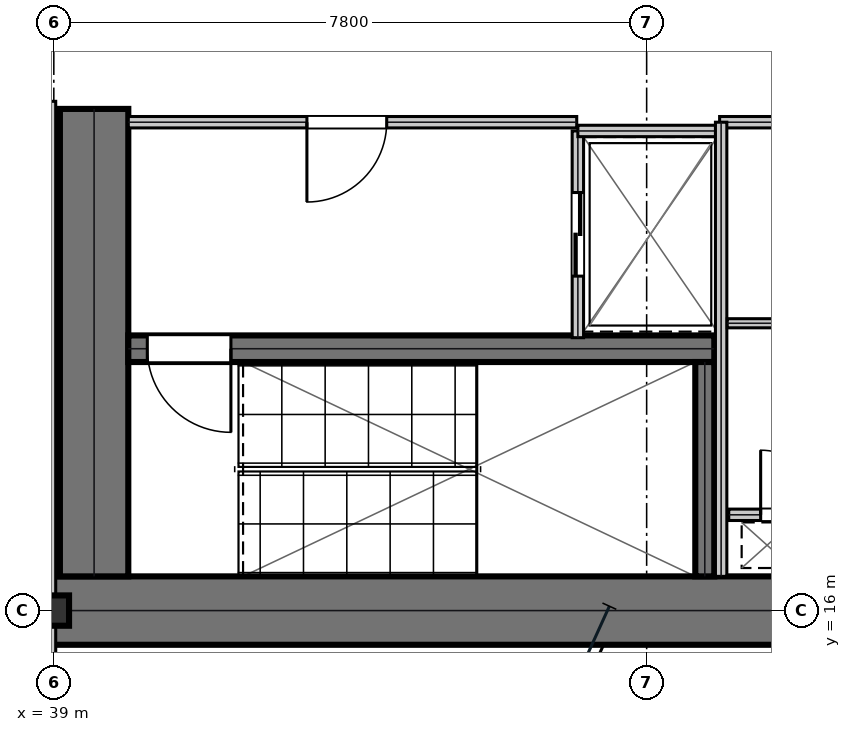
"""IFC4 building model, lengths in metres.
Left out: names, types, materials, properties, quantities, classifications, styles, units other than length and angle.
Written with IfcOpenShell. Run it as: python <this file> out.ifc"""

import sys

from ifc_helpers import new_model, si_unit, direction, frame, frame_2d, origin, origin_2d, place, context, subcontext, project, spatial, rectangle, i_section, extrude, element, fill, save


model = new_model("IFC4")
c1 = context("Model", 3, precision=1e-05, world=origin(), true_north=direction((0.0, 1.0)))
c2 = subcontext(c1, "Body", "Model", "MODEL_VIEW")
j1 = project(units=[si_unit("LENGTHUNIT", "METRE"), si_unit("PLANEANGLEUNIT", "RADIAN")], contexts=[c1])
p1 = place(None, origin())
s1 = spatial("IfcSite", under=j1, at=p1, CompositionType="ELEMENT")
p2 = place(p1, origin())
s2 = spatial("IfcBuilding", under=s1, at=p2, CompositionType="ELEMENT")
p3 = place(p2, frame((0.0, 0.0, 102.6)))
s3 = spatial("IfcBuildingStorey", under=s2, at=p3, CompositionType="ELEMENT", Elevation=102.6)
p4 = place(p3, frame((38.8, 16.0, 0.0), z_axis=(0.0, 0.0, 1.0), x_axis=(1.0, 0.0, 0.0)))
e1 = element("IfcWall", 1, at=p4, inside=s3, PredefinedType="SHEAR", context=c2, shape_type="SweptSolid", body=[
    extrude(rectangle(XDim=16.0, YDim=0.9, at=frame_2d((8.0, 0.0))), origin(), (0.0, 0.0, 1.0), 3.73),
])
p5 = place(p3, frame((39.53, 16.45, 0.0), z_axis=(0.0, 0.0, 1.0), x_axis=(0.0, 1.0, 0.0)))
e2 = element("IfcWall", 2, at=p5, inside=s3, PredefinedType="SHEAR", context=c2, shape_type="SweptSolid", body=[
    extrude(rectangle(XDim=6.15, YDim=0.9, at=frame_2d((3.075, 0.0))), origin(), (0.0, 0.0, 1.0), 3.73),
])
p6 = place(p3, frame((39.98, 19.445, 0.0), z_axis=(0.0, 0.0, 1.0), x_axis=(1.0, 0.0, 0.0)))
e3 = element("IfcWall", 3, at=p6, inside=s3, PredefinedType="SHEAR", context=c2, shape_type="SweptSolid", body=[
    extrude(rectangle(XDim=7.71, YDim=0.35, at=frame_2d((3.855, 0.0))), origin(), (0.0, 0.0, 1.0), 3.73),
])
p7 = place(p6, frame((0.25, 0.0, 0.0)))
e4 = element("IfcOpeningElement", 4, at=p7, cuts=e3, PredefinedType="OPENING", context=c2, shape_type="SweptSolid", body=[
    extrude(rectangle(XDim=1.1, YDim=2.15, at=frame_2d((0.55, 1.075))), frame((0.0, 0.185, 0.0), z_axis=(0.0, -1.0, 0.0), x_axis=(1.0, 0.0, 0.0)), (0.0, 0.0, 1.0), 0.37),
])
p8 = place(p3, frame((47.565, 16.45, 0.0), z_axis=(0.0, 0.0, 1.0), x_axis=(0.0, 1.0, 0.0)))
e5 = element("IfcWall", 5, at=p8, inside=s3, PredefinedType="SHEAR", context=c2, shape_type="SweptSolid", body=[
    extrude(rectangle(XDim=2.82, YDim=0.25, at=frame_2d((1.41, 0.0))), origin(), (0.0, 0.0, 1.0), 3.73),
])
p9 = place(p3, frame((39.0, 16.0, 0.0), z_axis=(0.0, 0.0, 1.0), x_axis=(1.0, 0.0, 0.0)))
e6 = element("IfcColumn", 6, at=p9, inside=s3, PredefinedType="COLUMN", context=c2, shape_type="SweptSolid", body=[
    extrude(i_section(OverallWidth=0.401, OverallDepth=0.399, WebThickness=0.025, FlangeThickness=0.04, at=origin_2d()), origin(), (0.0, 0.0, 1.0), 4.044),
])
p10 = place(p3, frame((39.98, 22.425, 0.0), z_axis=(0.0, 0.0, 1.0), x_axis=(1.0, 0.0, 0.0)))
e7 = element("IfcWall", 7, at=p10, inside=s3, PredefinedType="PARTITIONING", context=c2, shape_type="SweptSolid", body=[
    extrude(rectangle(XDim=5.9, YDim=0.15, at=frame_2d((2.95, 0.0))), origin(), (0.0, 0.0, 1.0), 3.73),
])
p11 = place(p10, frame((2.35, 0.0, 0.0)))
e8 = element("IfcOpeningElement", 8, at=p11, cuts=e7, PredefinedType="OPENING", context=c2, shape_type="SweptSolid", body=[
    extrude(rectangle(XDim=1.05, YDim=2.15, at=frame_2d((0.525, 1.075))), frame((0.0, 0.085, 0.0), z_axis=(0.0, -1.0, 0.0), x_axis=(1.0, 0.0, 0.0)), (0.0, 0.0, 1.0), 0.17),
])
p12 = place(p3, frame((45.895, 19.59, 0.0), z_axis=(0.0, 0.0, 1.0), x_axis=(0.0, 1.0, 0.0)))
e9 = element("IfcWall", 9, at=p12, inside=s3, PredefinedType="PARTITIONING", context=c2, shape_type="SweptSolid", body=[
    extrude(rectangle(XDim=2.72, YDim=0.15, at=frame_2d((1.36, 0.0))), origin(), (0.0, 0.0, 1.0), 3.73),
])
p13 = place(p12, frame((0.81, 0.0, 0.0)))
e10 = element("IfcOpeningElement", 10, at=p13, cuts=e9, PredefinedType="OPENING", context=c2, shape_type="SweptSolid", body=[
    extrude(rectangle(XDim=1.1, YDim=2.15, at=frame_2d((0.55, 1.075))), frame((0.0, 0.085, 0.0), z_axis=(0.0, -1.0, 0.0), x_axis=(1.0, 0.0, 0.0)), (0.0, 0.0, 1.0), 0.17),
])
p14 = place(p3, frame((45.895, 22.31, 0.0), z_axis=(0.0, 0.0, 1.0), x_axis=(1.0, 0.0, 0.0)))
e11 = element("IfcWall", 11, at=p14, inside=s3, PredefinedType="PARTITIONING", context=c2, shape_type="SweptSolid", body=[
    extrude(rectangle(XDim=1.915, YDim=0.15, at=frame_2d((0.958, 0.0))), origin(), (0.0, 0.0, 1.0), 3.73),
])
p15 = place(p3, frame((47.88, 17.26, 0.0), z_axis=(0.0, 0.0, 1.0), x_axis=(1.0, 0.0, 0.0)))
e12 = element("IfcWall", 12, at=p15, inside=s3, PredefinedType="PARTITIONING", context=c2, shape_type="SweptSolid", body=[
    extrude(rectangle(XDim=1.72, YDim=0.15, at=frame_2d((0.86, 0.0))), origin(), (0.0, 0.0, 1.0), 3.73),
])
p16 = place(p15, frame((0.42, 0.0, 0.0)))
e13 = element("IfcOpeningElement", 13, at=p16, cuts=e12, PredefinedType="OPENING", context=c2, shape_type="SweptSolid", body=[
    extrude(rectangle(XDim=0.85, YDim=2.15, at=frame_2d((0.425, 1.075))), frame((0.0, 0.085, 0.0), z_axis=(0.0, -1.0, 0.0), x_axis=(1.0, 0.0, 0.0)), (0.0, 0.0, 1.0), 0.17),
])
p17 = place(p3, frame((47.76, 22.425, 0.0), z_axis=(0.0, 0.0, 1.0), x_axis=(1.0, 0.0, 0.0)))
e14 = element("IfcWall", 14, at=p17, inside=s3, PredefinedType="PARTITIONING", context=c2, shape_type="SweptSolid", body=[
    extrude(rectangle(XDim=1.96, YDim=0.15, at=frame_2d((0.98, 0.0))), origin(), (0.0, 0.0, 1.0), 3.73),
])
p18 = place(p3, frame((47.78, 16.45, 0.0), z_axis=(0.0, 0.0, 1.0), x_axis=(0.0, 1.0, 0.0)))
e15 = element("IfcWall", 15, at=p18, inside=s3, PredefinedType="PARTITIONING", context=c2, shape_type="SweptSolid", body=[
    extrude(rectangle(XDim=5.975, YDim=0.15, at=frame_2d((2.988, 0.0))), origin(), (0.0, 0.0, 1.0), 3.73),
])
p19 = place(p3, frame((47.86, 19.78, 0.0), z_axis=(0.0, 0.0, 1.0), x_axis=(1.0, 0.0, 0.0)))
e16 = element("IfcWall", 16, at=p19, inside=s3, PredefinedType="PARTITIONING", context=c2, shape_type="SweptSolid", body=[
    extrude(rectangle(XDim=1.76, YDim=0.12, at=frame_2d((0.88, 0.0))), origin(), (0.0, 0.0, 1.0), 3.73),
])
p20 = place(p3, frame((38.95, 14.5, 0.0), z_axis=(0.0, 0.0, 1.0), x_axis=(0.0, 1.0, 0.0)))
e17 = element("IfcWall", 17, at=p20, inside=s3, PredefinedType="PARTITIONING", context=c2, shape_type="SweptSolid", body=[
    extrude(rectangle(XDim=8.2, YDim=0.15, at=frame_2d((4.1, 0.0))), origin(), (0.0, 0.0, 1.0), 3.101),
])
p21 = place(p11, frame((1.05, 0.0, 0.0), z_axis=(0.0, 0.0, 1.0), x_axis=(-1.0, 0.0, 0.0)))
e18 = element("IfcDoor", 18, at=p21, inside=s3, OperationType="SINGLE_SWING_RIGHT", PredefinedType="DOOR", context=c2, shape_type="SweptSolid", body=[
    extrude(rectangle(XDim=1.05, YDim=2.15, at=frame_2d((0.525, 1.075))), frame((0.0, 0.025, 0.0), z_axis=(0.0, -1.0, 0.0), x_axis=(1.0, 0.0, 0.0)), (0.0, 0.0, 1.0), 0.05),
])
fill(e8, e18)
p22 = place(p13, frame((1.1, 0.0, 0.0), z_axis=(0.0, 0.0, 1.0), x_axis=(-1.0, 0.0, 0.0)))
e19 = element("IfcDoor", 19, at=p22, inside=s3, OperationType="DOUBLE_DOOR_SLIDING", PredefinedType="DOOR", context=c2, shape_type="SweptSolid", body=[
    extrude(rectangle(XDim=1.1, YDim=2.15, at=frame_2d((0.55, 1.075))), frame((0.0, 0.025, 0.0), z_axis=(0.0, -1.0, 0.0), x_axis=(1.0, 0.0, 0.0)), (0.0, 0.0, 1.0), 0.05),
])
fill(e10, e19)
p23 = place(p16, origin())
e20 = element("IfcDoor", 20, at=p23, inside=s3, OperationType="SINGLE_SWING_LEFT", PredefinedType="TRAPDOOR", context=c2, shape_type="SweptSolid", body=[
    extrude(rectangle(XDim=0.85, YDim=2.15, at=frame_2d((0.425, 1.075))), frame((0.0, 0.025, 0.0), z_axis=(0.0, -1.0, 0.0), x_axis=(1.0, 0.0, 0.0)), (0.0, 0.0, 1.0), 0.05),
])
fill(e13, e20)
p24 = place(p7, frame((1.1, 0.0, 0.0), z_axis=(0.0, 0.0, 1.0), x_axis=(-1.0, 0.0, 0.0)))
e21 = element("IfcDoor", 21, at=p24, inside=s3, OperationType="SINGLE_SWING_LEFT", PredefinedType="DOOR", context=c2, shape_type="SweptSolid", body=[
    extrude(rectangle(XDim=1.1, YDim=2.15, at=frame_2d((0.55, 1.075))), frame((0.0, 0.025, 0.0), z_axis=(0.0, -1.0, 0.0), x_axis=(1.0, 0.0, 0.0)), (0.0, 0.0, 1.0), 0.05),
])
fill(e4, e21)
save(model, sys.argv[1])
